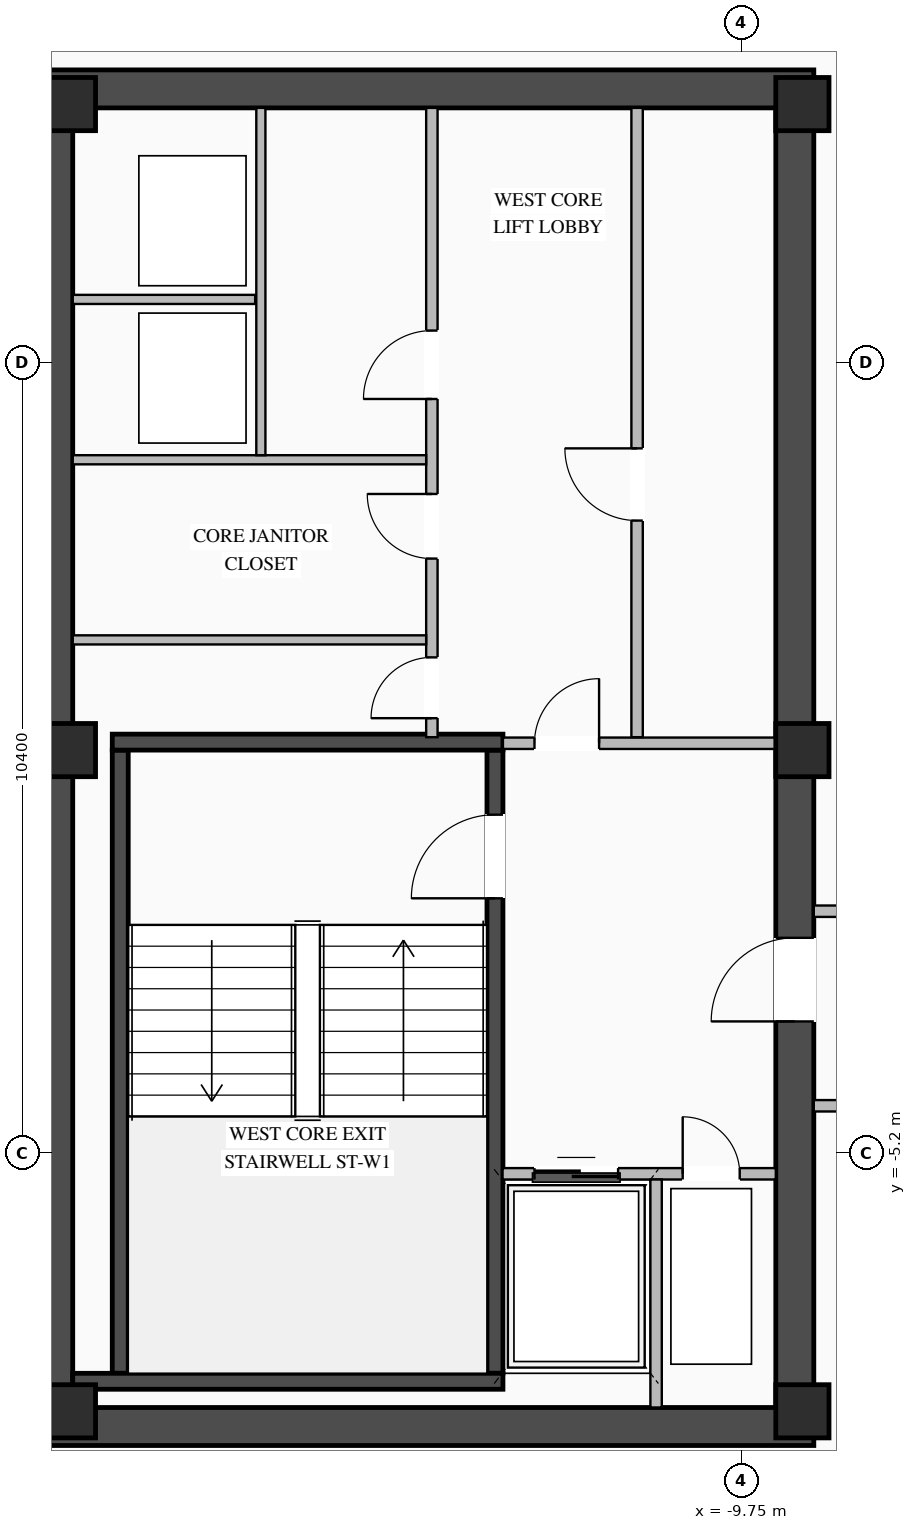
"""IFC4 building model, lengths in metres.
Left out: names, types, materials, properties, quantities, classifications, styles, units other than length and angle.
Written with IfcOpenShell. Run it as: python <this file> out.ifc"""

import sys

from ifc_helpers import new_model, si_unit, direction, frame, frame_2d, origin, origin_2d, place, context, subcontext, project, spatial, rectangle, extrude, element, fill, save


model = new_model("IFC4")
c1 = context("Model", 3, precision=1e-05, world=origin(), true_north=direction((0.0, 1.0)))
c2 = subcontext(c1, "Body", "Model", "MODEL_VIEW")
j1 = project(units=[si_unit("LENGTHUNIT", "METRE"), si_unit("PLANEANGLEUNIT", "RADIAN")], contexts=[c1])
p1 = place(None, origin())
s1 = spatial("IfcSite", under=j1, at=p1, CompositionType="ELEMENT")
p2 = place(p1, origin())
s2 = spatial("IfcBuilding", under=s1, at=p2, CompositionType="ELEMENT")
p3 = place(p2, frame((0.0, 0.0, 290.55)))
s3 = spatial("IfcBuildingStorey", under=s2, at=p3, CompositionType="ELEMENT", Elevation=290.55)
for number, where, z_axis, x_axis in (
    (1, (-19.05, -8.8, 0.0), (0.0, 0.0, 1.0), (1.0, 0.0, 0.0)),
    (2, (-19.05, 8.8, 0.0), (0.0, 0.0, 1.0), (1.0, 0.0, 0.0)),
):
    element("IfcWall", number, at=place(p3, frame(where, z_axis=z_axis, x_axis=x_axis)), inside=s3, PredefinedType="SHEAR", context=c2, shape_type="SweptSolid", body=[
        extrude(rectangle(XDim=10.25, YDim=0.5, at=frame_2d((5.125, 0.0))), origin(), (0.0, 0.0, 1.0), 3.35),
    ])
p4 = place(p3, frame((-18.8, -8.55, 0.0), z_axis=(0.0, 0.0, 1.0), x_axis=(0.0, 1.0, 0.0)))
e3 = element("IfcWall", 3, at=p4, inside=s3, PredefinedType="SHEAR", context=c2, shape_type="SweptSolid", body=[
    extrude(rectangle(XDim=17.1, YDim=0.5, at=frame_2d((8.55, 0.0))), origin(), (0.0, 0.0, 1.0), 3.35),
])
p5 = place(p3, frame((-9.05, -8.55, 0.0), z_axis=(0.0, 0.0, 1.0), x_axis=(0.0, 1.0, 0.0)))
e4 = element("IfcWall", 4, at=p5, inside=s3, PredefinedType="SHEAR", context=c2, shape_type="SweptSolid", body=[
    extrude(rectangle(XDim=17.1, YDim=0.5, at=frame_2d((8.55, 0.0))), origin(), (0.0, 0.0, 1.0), 3.35),
])
p6 = place(p5, frame((5.08, 0.0, 0.0)))
e5 = element("IfcOpeningElement", 5, at=p6, cuts=e4, PredefinedType="OPENING", context=c2, shape_type="SweptSolid", body=[
    extrude(rectangle(XDim=1.1, YDim=2.08, at=frame_2d((0.55, 1.04))), frame((0.0, 0.26, 0.0), z_axis=(0.0, -1.0, 0.0), x_axis=(1.0, 0.0, 0.0)), (0.0, 0.0, 1.0), 0.52),
])
p7 = place(p3, frame((-12.995, -8.1, 0.0), z_axis=(0.0, 0.0, 1.0), x_axis=(0.0, 1.0, 0.0)))
e6 = element("IfcWall", 6, at=p7, inside=s3, PredefinedType="SHEAR", context=c2, shape_type="SweptSolid", body=[
    extrude(rectangle(XDim=8.2, YDim=0.21, at=frame_2d((4.1, 0.0))), origin(), (0.0, 0.0, 1.0), 3.35),
])
p8 = place(p7, frame((6.25, 0.0, 0.0)))
e7 = element("IfcOpeningElement", 7, at=p8, cuts=e6, PredefinedType="OPENING", context=c2, shape_type="SweptSolid", body=[
    extrude(rectangle(XDim=1.1, YDim=2.15, at=frame_2d((0.55, 1.075))), frame((0.0, 0.115, 0.0), z_axis=(0.0, -1.0, 0.0), x_axis=(1.0, 0.0, 0.0)), (0.0, 0.0, 1.0), 0.23),
])
p9 = place(p3, frame((-17.925, -8.1, 0.0), z_axis=(0.0, 0.0, 1.0), x_axis=(0.0, 1.0, 0.0)))
e8 = element("IfcWall", 8, at=p9, inside=s3, PredefinedType="SHEAR", context=c2, shape_type="SweptSolid", body=[
    extrude(rectangle(XDim=8.2, YDim=0.21, at=frame_2d((4.1, 0.0))), origin(), (0.0, 0.0, 1.0), 3.35),
])
p10 = place(p3, frame((-18.55, -8.205, 0.0), z_axis=(0.0, 0.0, 1.0), x_axis=(1.0, 0.0, 0.0)))
e9 = element("IfcWall", 9, at=p10, inside=s3, PredefinedType="SHEAR", context=c2, shape_type="SweptSolid", body=[
    extrude(rectangle(XDim=5.66, YDim=0.21, at=frame_2d((2.83, 0.0))), origin(), (0.0, 0.0, 1.0), 3.35),
])
p11 = place(p3, frame((-12.89, 0.205, 0.0), z_axis=(0.0, 0.0, 1.0), x_axis=(-1.0, 0.0, 0.0)))
e10 = element("IfcWall", 10, at=p11, inside=s3, PredefinedType="SHEAR", context=c2, shape_type="SweptSolid", body=[
    extrude(rectangle(XDim=5.14, YDim=0.21, at=frame_2d((2.57, 0.0))), origin(), (0.0, 0.0, 1.0), 3.35),
])
for number, where, z_axis, x_axis in (
    (11, (-8.95, -8.6, 0.0), (0.0, 0.0, 1.0), (1.0, 0.0, 0.0)),
    (12, (-8.95, 0.1, 0.0), (0.0, 0.0, 1.0), (1.0, 0.0, 0.0)),
    (13, (-8.95, 8.6, 0.0), (0.0, 0.0, 1.0), (1.0, 0.0, 0.0)),
    (14, (-18.6, -8.6, 0.0), (0.0, 0.0, 1.0), (1.0, 0.0, 0.0)),
    (15, (-18.6, 0.1, 0.0), (0.0, 0.0, 1.0), (1.0, 0.0, 0.0)),
    (16, (-18.6, 8.6, 0.0), (0.0, 0.0, 1.0), (1.0, 0.0, 0.0)),
):
    element("IfcColumn", number, at=place(p3, frame(where, z_axis=z_axis, x_axis=x_axis)), inside=s3, PredefinedType="COLUMN", context=c2, shape_type="SweptSolid", body=[
        extrude(rectangle(XDim=0.7, YDim=0.7, at=origin_2d()), origin(), (0.0, 0.0, 1.0), 3.6),
    ])
p12 = place(p3, frame((-12.895, -5.475, 0.0), z_axis=(0.0, 0.0, 1.0), x_axis=(1.0, 0.0, 0.0)))
e17 = element("IfcWall", 17, at=p12, inside=s3, PredefinedType="STANDARD", context=c2, shape_type="SweptSolid", body=[
    extrude(rectangle(XDim=3.595, YDim=0.15, at=frame_2d((1.797, 0.0))), origin(), (0.0, 0.0, 1.0), 3.33),
])
p13 = place(p12, frame((0.42, 0.0, 0.0)))
e18 = element("IfcOpeningElement", 18, at=p13, cuts=e17, PredefinedType="OPENING", context=c2, shape_type="SweptSolid", body=[
    extrude(rectangle(XDim=1.1, YDim=2.15, at=frame_2d((0.55, 1.075))), frame((0.0, 0.085, 0.0), z_axis=(0.0, -1.0, 0.0), x_axis=(1.0, 0.0, 0.0)), (0.0, 0.0, 1.0), 0.17),
])
p14 = place(p12, frame((2.37, 0.0, 0.0)))
e19 = element("IfcOpeningElement", 19, at=p14, cuts=e17, PredefinedType="OPENING", context=c2, shape_type="SweptSolid", body=[
    extrude(rectangle(XDim=0.75, YDim=2.05, at=frame_2d((0.375, 1.025))), frame((0.0, 0.085, 0.0), z_axis=(0.0, -1.0, 0.0), x_axis=(1.0, 0.0, 0.0)), (0.0, 0.0, 1.0), 0.17),
])
p15 = place(p3, frame((-10.875, -8.55, 0.0), z_axis=(0.0, 0.0, 1.0), x_axis=(0.0, 1.0, 0.0)))
e20 = element("IfcWall", 20, at=p15, inside=s3, PredefinedType="STANDARD", context=c2, shape_type="SweptSolid", body=[
    extrude(rectangle(XDim=3.0, YDim=0.15, at=frame_2d((1.5, 0.0))), origin(), (0.0, 0.0, 1.0), 3.33),
])
p16 = place(p3, frame((-12.89, 0.19, 0.0), z_axis=(0.0, 0.0, 1.0), x_axis=(1.0, 0.0, 0.0)))
e21 = element("IfcWall", 21, at=p16, inside=s3, PredefinedType="STANDARD", context=c2, shape_type="SweptSolid", body=[
    extrude(rectangle(XDim=3.59, YDim=0.15, at=frame_2d((1.795, 0.0))), origin(), (0.0, 0.0, 1.0), 2.825),
])
p17 = place(p16, frame((0.415, 0.0, 0.0)))
e22 = element("IfcOpeningElement", 22, at=p17, cuts=e21, PredefinedType="OPENING", context=c2, shape_type="SweptSolid", body=[
    extrude(rectangle(XDim=0.85, YDim=2.04, at=frame_2d((0.425, 1.02))), frame((0.0, 0.085, 0.0), z_axis=(0.0, -1.0, 0.0), x_axis=(1.0, 0.0, 0.0)), (0.0, 0.0, 1.0), 0.17),
])
p18 = place(p3, frame((-11.125, 0.27, 0.0), z_axis=(0.0, 0.0, 1.0), x_axis=(0.0, 1.0, 0.0)))
e23 = element("IfcWall", 23, at=p18, inside=s3, PredefinedType="STANDARD", context=c2, shape_type="SweptSolid", body=[
    extrude(rectangle(XDim=8.28, YDim=0.15, at=frame_2d((4.14, 0.0))), origin(), (0.0, 0.0, 1.0), 3.33),
])
p19 = place(p18, frame((2.85, 0.0, 0.0)))
e24 = element("IfcOpeningElement", 24, at=p19, cuts=e23, PredefinedType="OPENING", context=c2, shape_type="SweptSolid", body=[
    extrude(rectangle(XDim=0.95, YDim=2.05, at=frame_2d((0.475, 1.025))), frame((0.0, 0.085, 0.0), z_axis=(0.0, -1.0, 0.0), x_axis=(1.0, 0.0, 0.0)), (0.0, 0.0, 1.0), 0.17),
])
p20 = place(p3, frame((-13.825, 0.27, 0.0), z_axis=(0.0, 0.0, 1.0), x_axis=(0.0, 1.0, 0.0)))
e25 = element("IfcWall", 25, at=p20, inside=s3, PredefinedType="STANDARD", context=c2, shape_type="SweptSolid", body=[
    extrude(rectangle(XDim=8.28, YDim=0.15, at=frame_2d((4.14, 0.0))), origin(), (0.0, 0.0, 1.0), 3.33),
])
p21 = place(p20, frame((4.45, 0.0, 0.0)))
e26 = element("IfcOpeningElement", 26, at=p21, cuts=e25, PredefinedType="OPENING", context=c2, shape_type="SweptSolid", body=[
    extrude(rectangle(XDim=0.9, YDim=2.05, at=frame_2d((0.45, 1.025))), frame((0.0, 0.085, 0.0), z_axis=(0.0, -1.0, 0.0), x_axis=(1.0, 0.0, 0.0)), (0.0, 0.0, 1.0), 0.17),
])
p22 = place(p20, frame((0.25, 0.0, 0.0)))
e27 = element("IfcOpeningElement", 27, at=p22, cuts=e25, PredefinedType="OPENING", context=c2, shape_type="SweptSolid", body=[
    extrude(rectangle(XDim=0.8, YDim=2.05, at=frame_2d((0.4, 1.025))), frame((0.0, 0.085, 0.0), z_axis=(0.0, -1.0, 0.0), x_axis=(1.0, 0.0, 0.0)), (0.0, 0.0, 1.0), 0.17),
])
p23 = place(p20, frame((2.35, 0.0, 0.0)))
e28 = element("IfcOpeningElement", 28, at=p23, cuts=e25, PredefinedType="OPENING", context=c2, shape_type="SweptSolid", body=[
    extrude(rectangle(XDim=0.85, YDim=2.05, at=frame_2d((0.425, 1.025))), frame((0.0, 0.085, 0.0), z_axis=(0.0, -1.0, 0.0), x_axis=(1.0, 0.0, 0.0)), (0.0, 0.0, 1.0), 0.17),
])
p24 = place(p3, frame((-18.55, 3.92, 0.0), z_axis=(0.0, 0.0, 1.0), x_axis=(1.0, 0.0, 0.0)))
e29 = element("IfcWall", 29, at=p24, inside=s3, PredefinedType="STANDARD", context=c2, shape_type="SweptSolid", body=[
    extrude(rectangle(XDim=4.65, YDim=0.12, at=frame_2d((2.325, 0.0))), origin(), (0.0, 0.0, 1.0), 3.33),
])
p25 = place(p3, frame((-18.55, 6.03, 0.0), z_axis=(0.0, 0.0, 1.0), x_axis=(1.0, 0.0, 0.0)))
e30 = element("IfcWall", 30, at=p25, inside=s3, PredefinedType="STANDARD", context=c2, shape_type="SweptSolid", body=[
    extrude(rectangle(XDim=2.4, YDim=0.12, at=frame_2d((1.2, 0.0))), origin(), (0.0, 0.0, 1.0), 3.33),
])
p26 = place(p3, frame((-16.075, 3.98, 0.0), z_axis=(0.0, 0.0, 1.0), x_axis=(0.0, 1.0, 0.0)))
e31 = element("IfcWall", 31, at=p26, inside=s3, PredefinedType="STANDARD", context=c2, shape_type="SweptSolid", body=[
    extrude(rectangle(XDim=4.57, YDim=0.12, at=frame_2d((2.285, 0.0))), origin(), (0.0, 0.0, 1.0), 3.33),
])
p27 = place(p3, frame((-18.55, 1.55, 0.0), z_axis=(0.0, 0.0, 1.0), x_axis=(1.0, 0.0, 0.0)))
e32 = element("IfcWall", 32, at=p27, inside=s3, PredefinedType="STANDARD", context=c2, shape_type="SweptSolid", body=[
    extrude(rectangle(XDim=4.65, YDim=0.12, at=frame_2d((2.325, 0.0))), origin(), (0.0, 0.0, 1.0), 3.33),
])
p28 = place(p3, frame((-8.8, -2.02, 0.0), z_axis=(0.0, 0.0, 1.0), x_axis=(1.0, 0.0, 0.0)))
e33 = element("IfcWall", 33, at=p28, inside=s3, PredefinedType="STANDARD", context=c2, shape_type="SweptSolid", body=[
    extrude(rectangle(XDim=17.6, YDim=0.15, at=frame_2d((8.8, 0.0))), origin(), (0.0, 0.0, 1.0), 3.33),
])
p29 = place(p28, frame((4.6, 0.0, 0.0)))
e34 = element("IfcOpeningElement", 34, at=p29, cuts=e33, PredefinedType="OPENING", context=c2, shape_type="SweptSolid", body=[
    extrude(rectangle(XDim=1.0, YDim=2.02, at=frame_2d((0.5, 1.01))), frame((0.0, 0.085, 0.0), z_axis=(0.0, -1.0, 0.0), x_axis=(1.0, 0.0, 0.0)), (0.0, 0.0, 1.0), 0.17),
])
p30 = place(p28, frame((13.4, 0.0, 0.0)))
e35 = element("IfcOpeningElement", 35, at=p30, cuts=e33, PredefinedType="OPENING", context=c2, shape_type="SweptSolid", body=[
    extrude(rectangle(XDim=1.0, YDim=2.02, at=frame_2d((0.5, 1.01))), frame((0.0, 0.085, 0.0), z_axis=(0.0, -1.0, 0.0), x_axis=(1.0, 0.0, 0.0)), (0.0, 0.0, 1.0), 0.17),
])
p31 = place(p3, frame((-8.8, -4.58, 0.0), z_axis=(0.0, 0.0, 1.0), x_axis=(1.0, 0.0, 0.0)))
e36 = element("IfcWall", 36, at=p31, inside=s3, PredefinedType="STANDARD", context=c2, shape_type="SweptSolid", body=[
    extrude(rectangle(XDim=17.6, YDim=0.15, at=frame_2d((8.8, 0.0))), origin(), (0.0, 0.0, 1.0), 3.33),
])
p32 = place(p31, frame((4.6, 0.0, 0.0)))
e37 = element("IfcOpeningElement", 37, at=p32, cuts=e36, PredefinedType="OPENING", context=c2, shape_type="SweptSolid", body=[
    extrude(rectangle(XDim=1.0, YDim=2.02, at=frame_2d((0.5, 1.01))), frame((0.0, 0.085, 0.0), z_axis=(0.0, -1.0, 0.0), x_axis=(1.0, 0.0, 0.0)), (0.0, 0.0, 1.0), 0.17),
])
p33 = place(p8, origin())
e38 = element("IfcDoor", 38, at=p33, inside=s3, OperationType="SINGLE_SWING_LEFT", PredefinedType="DOOR", context=c2, shape_type="SweptSolid", body=[
    extrude(rectangle(XDim=1.1, YDim=2.15, at=frame_2d((0.55, 1.075))), frame((0.0, 0.025, 0.0), z_axis=(0.0, -1.0, 0.0), x_axis=(1.0, 0.0, 0.0)), (0.0, 0.0, 1.0), 0.05),
])
fill(e7, e38)
p34 = place(p13, origin())
e39 = element("IfcDoor", 39, at=p34, inside=s3, OperationType="DOUBLE_DOOR_SLIDING", PredefinedType="DOOR", context=c2, shape_type="SweptSolid", body=[
    extrude(rectangle(XDim=1.1, YDim=2.15, at=frame_2d((0.55, 1.075))), frame((0.0, 0.025, 0.0), z_axis=(0.0, -1.0, 0.0), x_axis=(1.0, 0.0, 0.0)), (0.0, 0.0, 1.0), 0.05),
])
fill(e18, e39)
p35 = place(p14, origin())
e40 = element("IfcDoor", 40, at=p35, inside=s3, OperationType="SINGLE_SWING_LEFT", PredefinedType="DOOR", context=c2, shape_type="SweptSolid", body=[
    extrude(rectangle(XDim=0.75, YDim=2.05, at=frame_2d((0.375, 1.025))), frame((0.0, 0.025, 0.0), z_axis=(0.0, -1.0, 0.0), x_axis=(1.0, 0.0, 0.0)), (0.0, 0.0, 1.0), 0.05),
])
fill(e19, e40)
p36 = place(p17, origin())
e41 = element("IfcDoor", 41, at=p36, inside=s3, OperationType="SINGLE_SWING_RIGHT", PredefinedType="DOOR", context=c2, shape_type="SweptSolid", body=[
    extrude(rectangle(XDim=0.85, YDim=2.04, at=frame_2d((0.425, 1.02))), frame((0.0, 0.025, 0.0), z_axis=(0.0, -1.0, 0.0), x_axis=(1.0, 0.0, 0.0)), (0.0, 0.0, 1.0), 0.05),
])
fill(e22, e41)
p37 = place(p6, origin())
e42 = element("IfcDoor", 42, at=p37, inside=s3, OperationType="SINGLE_SWING_LEFT", PredefinedType="DOOR", context=c2, shape_type="SweptSolid", body=[
    extrude(rectangle(XDim=1.1, YDim=2.08, at=frame_2d((0.55, 1.04))), frame((0.0, 0.205, 0.0), z_axis=(0.0, -1.0, 0.0), x_axis=(1.0, 0.0, 0.0)), (0.0, 0.0, 1.0), 0.05),
])
fill(e5, e42)
p38 = place(p19, origin())
e43 = element("IfcDoor", 43, at=p38, inside=s3, OperationType="SINGLE_SWING_RIGHT", PredefinedType="DOOR", context=c2, shape_type="SweptSolid", body=[
    extrude(rectangle(XDim=0.95, YDim=2.05, at=frame_2d((0.475, 1.025))), frame((0.0, 0.025, 0.0), z_axis=(0.0, -1.0, 0.0), x_axis=(1.0, 0.0, 0.0)), (0.0, 0.0, 1.0), 0.05),
])
fill(e24, e43)
p39 = place(p21, origin())
e44 = element("IfcDoor", 44, at=p39, inside=s3, OperationType="SINGLE_SWING_LEFT", PredefinedType="DOOR", context=c2, shape_type="SweptSolid", body=[
    extrude(rectangle(XDim=0.9, YDim=2.05, at=frame_2d((0.45, 1.025))), frame((0.0, 0.025, 0.0), z_axis=(0.0, -1.0, 0.0), x_axis=(1.0, 0.0, 0.0)), (0.0, 0.0, 1.0), 0.05),
])
fill(e26, e44)
p40 = place(p22, origin())
e45 = element("IfcDoor", 45, at=p40, inside=s3, OperationType="SINGLE_SWING_LEFT", PredefinedType="DOOR", context=c2, shape_type="SweptSolid", body=[
    extrude(rectangle(XDim=0.8, YDim=2.05, at=frame_2d((0.4, 1.025))), frame((0.0, 0.025, 0.0), z_axis=(0.0, -1.0, 0.0), x_axis=(1.0, 0.0, 0.0)), (0.0, 0.0, 1.0), 0.05),
])
fill(e27, e45)
p41 = place(p23, origin())
e46 = element("IfcDoor", 46, at=p41, inside=s3, OperationType="SINGLE_SWING_RIGHT", PredefinedType="DOOR", context=c2, shape_type="SweptSolid", body=[
    extrude(rectangle(XDim=0.85, YDim=2.05, at=frame_2d((0.425, 1.025))), frame((0.0, 0.025, 0.0), z_axis=(0.0, -1.0, 0.0), x_axis=(1.0, 0.0, 0.0)), (0.0, 0.0, 1.0), 0.05),
])
fill(e28, e46)
save(model, sys.argv[1])
